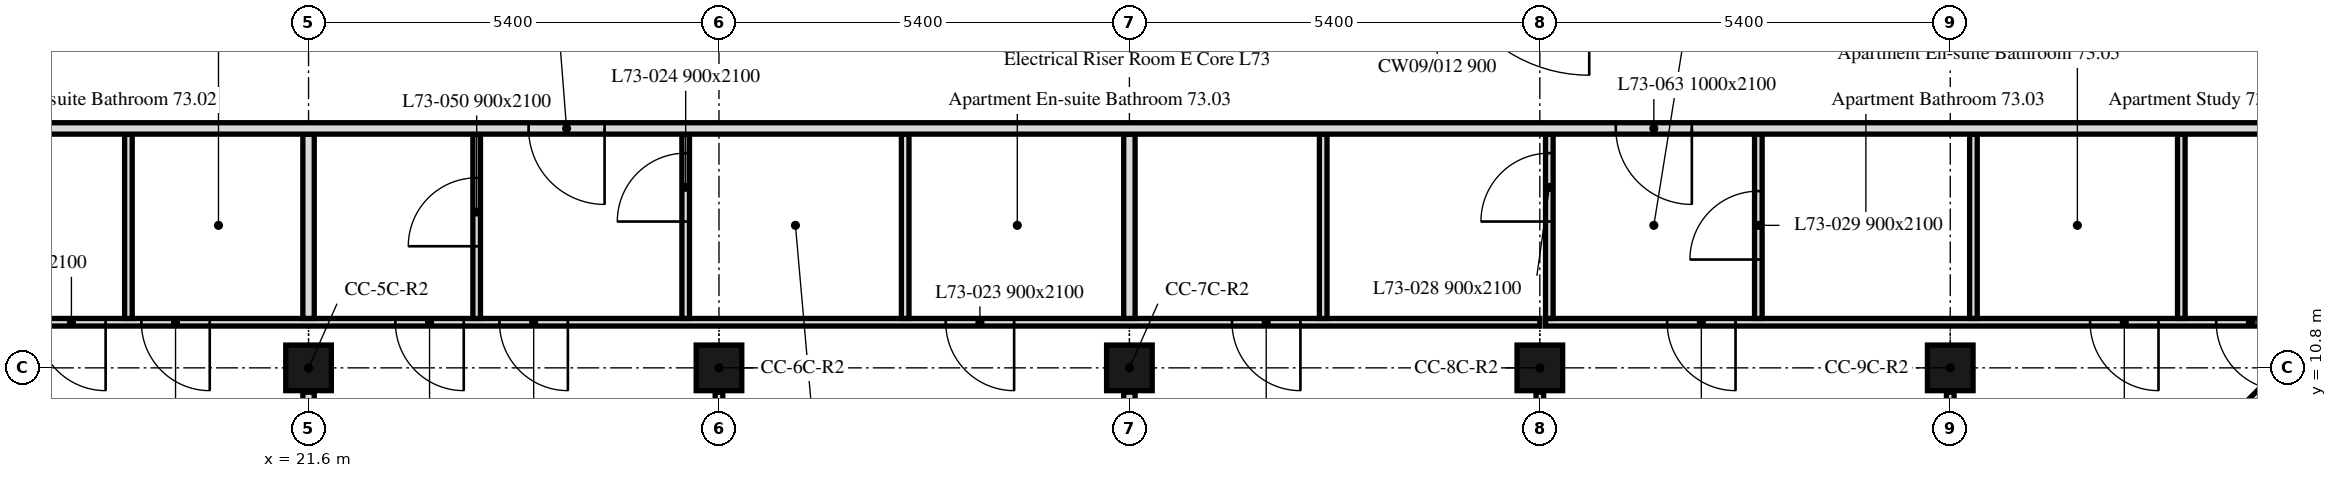
"""IFC4 building model, lengths in metres.
Left out: names, types, materials, properties, quantities, classifications, styles, units other than length and angle.
Written with IfcOpenShell. Run it as: python <this file> out.ifc"""

import sys

from ifc_helpers import new_model, si_unit, direction, frame, frame_2d, origin, origin_2d, place, context, subcontext, project, spatial, rectangle, extrude, element, fill, save


model = new_model("IFC4")
c1 = context("Model", 3, precision=1e-05, world=origin(), true_north=direction((0.0, 1.0)))
c2 = subcontext(c1, "Body", "Model", "MODEL_VIEW")
j1 = project(units=[si_unit("LENGTHUNIT", "METRE"), si_unit("PLANEANGLEUNIT", "RADIAN")], contexts=[c1])
p1 = place(None, origin())
s1 = spatial("IfcSite", under=j1, at=p1, CompositionType="ELEMENT")
p2 = place(p1, origin())
s2 = spatial("IfcBuilding", under=s1, at=p2, CompositionType="ELEMENT")
p3 = place(p2, frame((0.0, 0.0, 295.0)))
s3 = spatial("IfcBuildingStorey", under=s2, at=p3, CompositionType="ELEMENT", Elevation=295.0)
for number, where, z_axis, x_axis in (
    (1, (21.6, 10.8, 0.0), (0.0, 0.0, 1.0), (1.0, 0.0, 0.0)),
    (2, (27.0, 10.8, 0.0), (0.0, 0.0, 1.0), (1.0, 0.0, 0.0)),
    (3, (32.4, 10.8, 0.0), (0.0, 0.0, 1.0), (1.0, 0.0, 0.0)),
    (4, (37.8, 10.8, 0.0), (0.0, 0.0, 1.0), (1.0, 0.0, 0.0)),
    (5, (43.2, 10.8, 0.0), (0.0, 0.0, 1.0), (1.0, 0.0, 0.0)),
):
    element("IfcColumn", number, at=place(p3, frame(where, z_axis=z_axis, x_axis=x_axis)), inside=s3, PredefinedType="COLUMN", context=c2, shape_type="SweptSolid", body=[
        extrude(rectangle(XDim=0.6, YDim=0.6, at=origin_2d()), origin(), (0.0, 0.0, 1.0), 3.0),
    ])
p4 = place(p3, frame((43.051, 6.099, 0.0), z_axis=(0.0, 0.0, 1.0), x_axis=(0.707106781187, 0.707106781187, 0.0)))
e6 = element("IfcWall", 6, at=p4, inside=s3, PredefinedType="SOLIDWALL", context=c2, shape_type="SweptSolid", body=[
    extrude(rectangle(XDim=6.86, YDim=0.3, at=frame_2d((3.43, 0.0))), origin(), (0.0, 0.0, 1.0), 3.0),
])
p5 = place(p4, frame((1.73, 0.0, 0.9)))
e7 = element("IfcOpeningElement", 7, at=p5, cuts=e6, PredefinedType="OPENING", context=c2, shape_type="SweptSolid", body=[
    extrude(rectangle(XDim=3.4, YDim=1.7, at=frame_2d((1.7, 0.85))), frame((0.0, 0.16, 0.0), z_axis=(0.0, -1.0, 0.0), x_axis=(1.0, 0.0, 0.0)), (0.0, 0.0, 1.0), 0.32),
])
p6 = place(p3, frame((21.6, 6.151, 0.0), z_axis=(0.0, 0.0, 1.0), x_axis=(0.0, 1.0, 0.0)))
e8 = element("IfcWall", 8, at=p6, inside=s3, PredefinedType="PARTITIONING", context=c2, shape_type="SweptSolid", body=[
    extrude(rectangle(XDim=4.329, YDim=0.15, at=frame_2d((2.165, 0.0))), origin(), (0.0, 0.0, 1.0), 3.0),
])
p7 = place(p3, frame((37.8, 11.4, 0.0), z_axis=(0.0, 0.0, 1.0), x_axis=(-1.0, 0.0, 0.0)))
e9 = element("IfcWall", 9, at=p7, inside=s3, PredefinedType="PARTITIONING", context=c2, shape_type="SweptSolid", body=[
    extrude(rectangle(XDim=21.6, YDim=0.1, at=frame_2d((10.8, 0.0))), origin(), (0.0, 0.0, 1.0), 3.0),
])
p8 = place(p7, frame((18.87, 0.0, 0.0)))
e10 = element("IfcOpeningElement", 10, at=p8, cuts=e9, PredefinedType="OPENING", context=c2, shape_type="SweptSolid", body=[
    extrude(rectangle(XDim=0.9, YDim=2.1, at=frame_2d((0.45, 1.05))), frame((0.0, 0.05, 0.0), z_axis=(0.0, -1.0, 0.0), x_axis=(1.0, 0.0, 0.0)), (0.0, 0.0, 1.0), 0.1),
])
p9 = place(p7, frame((17.5, 0.0, 0.0)))
e11 = element("IfcOpeningElement", 11, at=p9, cuts=e9, PredefinedType="OPENING", context=c2, shape_type="SweptSolid", body=[
    extrude(rectangle(XDim=0.9, YDim=2.1, at=frame_2d((0.45, 1.05))), frame((0.0, 0.05, 0.0), z_axis=(0.0, -1.0, 0.0), x_axis=(1.0, 0.0, 0.0)), (0.0, 0.0, 1.0), 0.1),
])
p10 = place(p7, frame((6.917, 0.0, 0.0)))
e12 = element("IfcOpeningElement", 12, at=p10, cuts=e9, PredefinedType="OPENING", context=c2, shape_type="SweptSolid", body=[
    extrude(rectangle(XDim=0.9, YDim=2.1, at=frame_2d((0.45, 1.05))), frame((0.0, 0.05, 0.0), z_axis=(0.0, -1.0, 0.0), x_axis=(1.0, 0.0, 0.0)), (0.0, 0.0, 1.0), 0.1),
])
p11 = place(p7, frame((3.15, 0.0, 0.0)))
e13 = element("IfcOpeningElement", 13, at=p11, cuts=e9, PredefinedType="OPENING", context=c2, shape_type="SweptSolid", body=[
    extrude(rectangle(XDim=0.9, YDim=2.1, at=frame_2d((0.45, 1.05))), frame((0.0, 0.05, 0.0), z_axis=(0.0, -1.0, 0.0), x_axis=(1.0, 0.0, 0.0)), (0.0, 0.0, 1.0), 0.1),
])
p12 = place(p7, frame((14.158, 0.0, 0.0)))
e14 = element("IfcOpeningElement", 14, at=p12, cuts=e9, PredefinedType="OPENING", context=c2, shape_type="SweptSolid", body=[
    extrude(rectangle(XDim=0.9, YDim=2.1, at=frame_2d((0.45, 1.05))), frame((0.0, 0.05, 0.0), z_axis=(0.0, -1.0, 0.0), x_axis=(1.0, 0.0, 0.0)), (0.0, 0.0, 1.0), 0.1),
])
p13 = place(p7, frame((12.788, 0.0, 0.0)))
e15 = element("IfcOpeningElement", 15, at=p13, cuts=e9, PredefinedType="OPENING", context=c2, shape_type="SweptSolid", body=[
    extrude(rectangle(XDim=0.9, YDim=2.1, at=frame_2d((0.45, 1.05))), frame((0.0, 0.05, 0.0), z_axis=(0.0, -1.0, 0.0), x_axis=(1.0, 0.0, 0.0)), (0.0, 0.0, 1.0), 0.1),
])
p14 = place(p3, frame((19.23, 11.45, 0.0), z_axis=(0.0, 0.0, 1.0), x_axis=(0.0, 1.0, 0.0)))
e16 = element("IfcWall", 16, at=p14, inside=s3, PredefinedType="PARTITIONING", context=c2, shape_type="SweptSolid", body=[
    extrude(rectangle(XDim=2.425, YDim=0.1, at=frame_2d((1.212, 0.0))), origin(), (0.0, 0.0, 1.0), 3.0),
])
p15 = place(p3, frame((21.6, 11.45, 0.0), z_axis=(0.0, 0.0, 1.0), x_axis=(0.0, 1.0, 0.0)))
e17 = element("IfcWall", 17, at=p15, inside=s3, PredefinedType="PARTITIONING", context=c2, shape_type="SweptSolid", body=[
    extrude(rectangle(XDim=2.425, YDim=0.15, at=frame_2d((1.212, 0.0))), origin(), (0.0, 0.0, 1.0), 3.0),
])
p16 = place(p3, frame((27.0, 6.151, 0.0), z_axis=(0.0, 0.0, 1.0), x_axis=(0.0, 1.0, 0.0)))
e18 = element("IfcWall", 18, at=p16, inside=s3, PredefinedType="PARTITIONING", context=c2, shape_type="SweptSolid", body=[
    extrude(rectangle(XDim=4.329, YDim=0.1, at=frame_2d((2.165, 0.0))), origin(), (0.0, 0.0, 1.0), 3.0),
])
p17 = place(p16, frame((1.424, 0.0, 0.0)))
e19 = element("IfcOpeningElement", 19, at=p17, cuts=e18, PredefinedType="OPENING", context=c2, shape_type="SweptSolid", body=[
    extrude(rectangle(XDim=0.9, YDim=2.1, at=frame_2d((0.45, 1.05))), frame((0.0, 0.05, 0.0), z_axis=(0.0, -1.0, 0.0), x_axis=(1.0, 0.0, 0.0)), (0.0, 0.0, 1.0), 0.1),
])
p18 = place(p3, frame((32.4, 6.151, 0.0), z_axis=(0.0, 0.0, 1.0), x_axis=(0.0, 1.0, 0.0)))
e20 = element("IfcWall", 20, at=p18, inside=s3, PredefinedType="PARTITIONING", context=c2, shape_type="SweptSolid", body=[
    extrude(rectangle(XDim=4.329, YDim=0.15, at=frame_2d((2.165, 0.0))), origin(), (0.0, 0.0, 1.0), 3.0),
])
p19 = place(p3, frame((23.812, 11.45, 0.0), z_axis=(0.0, 0.0, 1.0), x_axis=(0.0, 1.0, 0.0)))
e21 = element("IfcWall", 21, at=p19, inside=s3, PredefinedType="PARTITIONING", context=c2, shape_type="SweptSolid", body=[
    extrude(rectangle(XDim=2.425, YDim=0.1, at=frame_2d((1.212, 0.0))), origin(), (0.0, 0.0, 1.0), 3.0),
])
p20 = place(p19, frame((0.95, 0.0, 0.0)))
e22 = element("IfcOpeningElement", 22, at=p20, cuts=e21, PredefinedType="OPENING", context=c2, shape_type="SweptSolid", body=[
    extrude(rectangle(XDim=0.9, YDim=2.1, at=frame_2d((0.45, 1.05))), frame((0.0, 0.05, 0.0), z_axis=(0.0, -1.0, 0.0), x_axis=(1.0, 0.0, 0.0)), (0.0, 0.0, 1.0), 0.1),
])
p21 = place(p3, frame((26.562, 11.45, 0.0), z_axis=(0.0, 0.0, 1.0), x_axis=(0.0, 1.0, 0.0)))
e23 = element("IfcWall", 23, at=p21, inside=s3, PredefinedType="PARTITIONING", context=c2, shape_type="SweptSolid", body=[
    extrude(rectangle(XDim=2.425, YDim=0.1, at=frame_2d((1.212, 0.0))), origin(), (0.0, 0.0, 1.0), 3.0),
])
p22 = place(p21, frame((1.275, 0.0, 0.0)))
e24 = element("IfcOpeningElement", 24, at=p22, cuts=e23, PredefinedType="OPENING", context=c2, shape_type="SweptSolid", body=[
    extrude(rectangle(XDim=0.9, YDim=2.1, at=frame_2d((0.45, 1.05))), frame((0.0, 0.05, 0.0), z_axis=(0.0, -1.0, 0.0), x_axis=(1.0, 0.0, 0.0)), (0.0, 0.0, 1.0), 0.1),
])
p23 = place(p3, frame((29.45, 11.45, 0.0), z_axis=(0.0, 0.0, 1.0), x_axis=(0.0, 1.0, 0.0)))
e25 = element("IfcWall", 25, at=p23, inside=s3, PredefinedType="PARTITIONING", context=c2, shape_type="SweptSolid", body=[
    extrude(rectangle(XDim=2.425, YDim=0.1, at=frame_2d((1.212, 0.0))), origin(), (0.0, 0.0, 1.0), 3.0),
])
p24 = place(p3, frame((32.4, 11.45, 0.0), z_axis=(0.0, 0.0, 1.0), x_axis=(0.0, 1.0, 0.0)))
e26 = element("IfcWall", 26, at=p24, inside=s3, PredefinedType="PARTITIONING", context=c2, shape_type="SweptSolid", body=[
    extrude(rectangle(XDim=2.425, YDim=0.15, at=frame_2d((1.212, 0.0))), origin(), (0.0, 0.0, 1.0), 3.0),
])
p25 = place(p3, frame((37.8, 6.151, 0.0), z_axis=(0.0, 0.0, 1.0), x_axis=(0.0, 1.0, 0.0)))
e27 = element("IfcWall", 27, at=p25, inside=s3, PredefinedType="PARTITIONING", context=c2, shape_type="SweptSolid", body=[
    extrude(rectangle(XDim=4.329, YDim=0.1, at=frame_2d((2.165, 0.0))), origin(), (0.0, 0.0, 1.0), 3.0),
])
p26 = place(p25, frame((1.424, 0.0, 0.0)))
e28 = element("IfcOpeningElement", 28, at=p26, cuts=e27, PredefinedType="OPENING", context=c2, shape_type="SweptSolid", body=[
    extrude(rectangle(XDim=0.9, YDim=2.1, at=frame_2d((0.45, 1.05))), frame((0.0, 0.05, 0.0), z_axis=(0.0, -1.0, 0.0), x_axis=(1.0, 0.0, 0.0)), (0.0, 0.0, 1.0), 0.1),
])
p27 = place(p3, frame((43.2, 6.512, 0.0), z_axis=(0.0, 0.0, 1.0), x_axis=(0.0, 1.0, 0.0)))
e29 = element("IfcWall", 29, at=p27, inside=s3, PredefinedType="PARTITIONING", context=c2, shape_type="SweptSolid", body=[
    extrude(rectangle(XDim=3.968, YDim=0.1, at=frame_2d((1.984, 0.0))), origin(), (0.0, 0.0, 1.0), 3.0),
])
p28 = place(p27, frame((1.938, 0.0, 0.0)))
e30 = element("IfcOpeningElement", 30, at=p28, cuts=e29, PredefinedType="OPENING", context=c2, shape_type="SweptSolid", body=[
    extrude(rectangle(XDim=0.9, YDim=2.1, at=frame_2d((0.45, 1.05))), frame((0.0, 0.05, 0.0), z_axis=(0.0, -1.0, 0.0), x_axis=(1.0, 0.0, 0.0)), (0.0, 0.0, 1.0), 0.1),
])
p29 = place(p3, frame((47.849, 11.4, 0.0), z_axis=(0.0, 0.0, 1.0), x_axis=(-1.0, 0.0, 0.0)))
e31 = element("IfcWall", 31, at=p29, inside=s3, PredefinedType="PARTITIONING", context=c2, shape_type="SweptSolid", body=[
    extrude(rectangle(XDim=9.974, YDim=0.1, at=frame_2d((4.987, 0.0))), origin(), (0.0, 0.0, 1.0), 3.0),
])
p30 = place(p29, frame((1.909, 0.0, 0.0)))
e32 = element("IfcOpeningElement", 32, at=p30, cuts=e31, PredefinedType="OPENING", context=c2, shape_type="SweptSolid", body=[
    extrude(rectangle(XDim=0.9, YDim=2.1, at=frame_2d((0.45, 1.05))), frame((0.0, 0.05, 0.0), z_axis=(0.0, -1.0, 0.0), x_axis=(1.0, 0.0, 0.0)), (0.0, 0.0, 1.0), 0.1),
])
p31 = place(p29, frame((0.25, 0.0, 0.0)))
e33 = element("IfcOpeningElement", 33, at=p31, cuts=e31, PredefinedType="OPENING", context=c2, shape_type="SweptSolid", body=[
    extrude(rectangle(XDim=0.9, YDim=2.1, at=frame_2d((0.45, 1.05))), frame((0.0, 0.05, 0.0), z_axis=(0.0, -1.0, 0.0), x_axis=(1.0, 0.0, 0.0)), (0.0, 0.0, 1.0), 0.1),
])
p32 = place(p29, frame((7.474, 0.0, 0.0)))
e34 = element("IfcOpeningElement", 34, at=p32, cuts=e31, PredefinedType="OPENING", context=c2, shape_type="SweptSolid", body=[
    extrude(rectangle(XDim=0.9, YDim=2.1, at=frame_2d((0.45, 1.05))), frame((0.0, 0.05, 0.0), z_axis=(0.0, -1.0, 0.0), x_axis=(1.0, 0.0, 0.0)), (0.0, 0.0, 1.0), 0.1),
])
p33 = place(p3, frame((34.95, 11.45, 0.0), z_axis=(0.0, 0.0, 1.0), x_axis=(0.0, 1.0, 0.0)))
e35 = element("IfcWall", 35, at=p33, inside=s3, PredefinedType="PARTITIONING", context=c2, shape_type="SweptSolid", body=[
    extrude(rectangle(XDim=2.425, YDim=0.1, at=frame_2d((1.212, 0.0))), origin(), (0.0, 0.0, 1.0), 3.0),
])
p34 = place(p3, frame((37.925, 11.45, 0.0), z_axis=(0.0, 0.0, 1.0), x_axis=(0.0, 1.0, 0.0)))
e36 = element("IfcWall", 36, at=p34, inside=s3, PredefinedType="PARTITIONING", context=c2, shape_type="SweptSolid", body=[
    extrude(rectangle(XDim=2.425, YDim=0.1, at=frame_2d((1.212, 0.0))), origin(), (0.0, 0.0, 1.0), 3.0),
])
p35 = place(p34, frame((1.275, 0.0, 0.0)))
e37 = element("IfcOpeningElement", 37, at=p35, cuts=e36, PredefinedType="OPENING", context=c2, shape_type="SweptSolid", body=[
    extrude(rectangle(XDim=0.9, YDim=2.1, at=frame_2d((0.45, 1.05))), frame((0.0, 0.05, 0.0), z_axis=(0.0, -1.0, 0.0), x_axis=(1.0, 0.0, 0.0)), (0.0, 0.0, 1.0), 0.1),
])
p36 = place(p3, frame((40.675, 11.45, 0.0), z_axis=(0.0, 0.0, 1.0), x_axis=(0.0, 1.0, 0.0)))
e38 = element("IfcWall", 38, at=p36, inside=s3, PredefinedType="PARTITIONING", context=c2, shape_type="SweptSolid", body=[
    extrude(rectangle(XDim=2.425, YDim=0.1, at=frame_2d((1.212, 0.0))), origin(), (0.0, 0.0, 1.0), 3.0),
])
p37 = place(p36, frame((0.775, 0.0, 0.0)))
e39 = element("IfcOpeningElement", 39, at=p37, cuts=e38, PredefinedType="OPENING", context=c2, shape_type="SweptSolid", body=[
    extrude(rectangle(XDim=0.9, YDim=2.1, at=frame_2d((0.45, 1.05))), frame((0.0, 0.05, 0.0), z_axis=(0.0, -1.0, 0.0), x_axis=(1.0, 0.0, 0.0)), (0.0, 0.0, 1.0), 0.1),
])
for number, where, z_axis, x_axis in (
    (40, (43.505, 11.45, 0.0), (0.0, 0.0, 1.0), (0.0, 1.0, 0.0)),
    (41, (46.24, 11.45, 0.0), (0.0, 0.0, 1.0), (0.0, 1.0, 0.0)),
):
    element("IfcWall", number, at=place(p3, frame(where, z_axis=z_axis, x_axis=x_axis)), inside=s3, PredefinedType="PARTITIONING", context=c2, shape_type="SweptSolid", body=[
        extrude(rectangle(XDim=2.425, YDim=0.1, at=frame_2d((1.212, 0.0))), origin(), (0.0, 0.0, 1.0), 3.0),
    ])
p38 = place(p3, frame((47.849, 13.95, 0.0), z_axis=(0.0, 0.0, 1.0), x_axis=(-1.0, 0.0, 0.0)))
e42 = element("IfcWall", 42, at=p38, inside=s3, PredefinedType="PARTITIONING", context=c2, shape_type="SweptSolid", body=[
    extrude(rectangle(XDim=41.698, YDim=0.15, at=frame_2d((20.849, 0.0))), origin(), (0.0, 0.0, 1.0), 3.0),
])
p39 = place(p38, frame((35.609, 0.0, 0.0)))
e43 = element("IfcOpeningElement", 43, at=p39, cuts=e42, PredefinedType="OPENING", context=c2, shape_type="SweptSolid", body=[
    extrude(rectangle(XDim=1.0, YDim=2.1, at=frame_2d((0.5, 1.05))), frame((0.0, 0.075, 0.0), z_axis=(0.0, -1.0, 0.0), x_axis=(1.0, 0.0, 0.0)), (0.0, 0.0, 1.0), 0.15),
])
p40 = place(p38, frame((22.354, 0.0, 0.0)))
e44 = element("IfcOpeningElement", 44, at=p40, cuts=e42, PredefinedType="OPENING", context=c2, shape_type="SweptSolid", body=[
    extrude(rectangle(XDim=1.0, YDim=2.1, at=frame_2d((0.5, 1.05))), frame((0.0, 0.075, 0.0), z_axis=(0.0, -1.0, 0.0), x_axis=(1.0, 0.0, 0.0)), (0.0, 0.0, 1.0), 0.15),
])
p41 = place(p38, frame((8.049, 0.0, 0.0)))
e45 = element("IfcOpeningElement", 45, at=p41, cuts=e42, PredefinedType="OPENING", context=c2, shape_type="SweptSolid", body=[
    extrude(rectangle(XDim=1.0, YDim=2.1, at=frame_2d((0.5, 1.05))), frame((0.0, 0.075, 0.0), z_axis=(0.0, -1.0, 0.0), x_axis=(1.0, 0.0, 0.0)), (0.0, 0.0, 1.0), 0.15),
])
p42 = place(p8, origin())
e46 = element("IfcDoor", 46, at=p42, inside=s3, OperationType="SINGLE_SWING_LEFT", PredefinedType="DOOR", context=c2, shape_type="SweptSolid", body=[
    extrude(rectangle(XDim=0.9, YDim=2.1, at=frame_2d((0.45, 1.05))), frame((0.0, 0.025, 0.0), z_axis=(0.0, -1.0, 0.0), x_axis=(1.0, 0.0, 0.0)), (0.0, 0.0, 1.0), 0.05),
])
fill(e10, e46)
p43 = place(p9, origin())
e47 = element("IfcDoor", 47, at=p43, inside=s3, OperationType="SINGLE_SWING_RIGHT", PredefinedType="DOOR", context=c2, shape_type="SweptSolid", body=[
    extrude(rectangle(XDim=0.9, YDim=2.1, at=frame_2d((0.45, 1.05))), frame((0.0, 0.025, 0.0), z_axis=(0.0, -1.0, 0.0), x_axis=(1.0, 0.0, 0.0)), (0.0, 0.0, 1.0), 0.05),
])
fill(e11, e47)
p44 = place(p10, origin())
e48 = element("IfcDoor", 48, at=p44, inside=s3, OperationType="SINGLE_SWING_LEFT", PredefinedType="DOOR", context=c2, shape_type="SweptSolid", body=[
    extrude(rectangle(XDim=0.9, YDim=2.1, at=frame_2d((0.45, 1.05))), frame((0.0, 0.025, 0.0), z_axis=(0.0, -1.0, 0.0), x_axis=(1.0, 0.0, 0.0)), (0.0, 0.0, 1.0), 0.05),
])
fill(e12, e48)
p45 = place(p22, origin())
e49 = element("IfcDoor", 49, at=p45, inside=s3, OperationType="SINGLE_SWING_LEFT", PredefinedType="DOOR", context=c2, shape_type="SweptSolid", body=[
    extrude(rectangle(XDim=0.9, YDim=2.1, at=frame_2d((0.45, 1.05))), frame((0.0, 0.025, 0.0), z_axis=(0.0, -1.0, 0.0), x_axis=(1.0, 0.0, 0.0)), (0.0, 0.0, 1.0), 0.05),
])
fill(e24, e49)
p46 = place(p11, origin())
e50 = element("IfcDoor", 50, at=p46, inside=s3, OperationType="SINGLE_SWING_RIGHT", PredefinedType="DOOR", context=c2, shape_type="SweptSolid", body=[
    extrude(rectangle(XDim=0.9, YDim=2.1, at=frame_2d((0.45, 1.05))), frame((0.0, 0.025, 0.0), z_axis=(0.0, -1.0, 0.0), x_axis=(1.0, 0.0, 0.0)), (0.0, 0.0, 1.0), 0.05),
])
fill(e13, e50)
p47 = place(p30, origin())
e51 = element("IfcDoor", 51, at=p47, inside=s3, OperationType="SINGLE_SWING_LEFT", PredefinedType="DOOR", context=c2, shape_type="SweptSolid", body=[
    extrude(rectangle(XDim=0.9, YDim=2.1, at=frame_2d((0.45, 1.05))), frame((0.0, 0.025, 0.0), z_axis=(0.0, -1.0, 0.0), x_axis=(1.0, 0.0, 0.0)), (0.0, 0.0, 1.0), 0.05),
])
fill(e32, e51)
p48 = place(p31, origin())
e52 = element("IfcDoor", 52, at=p48, inside=s3, OperationType="SINGLE_SWING_RIGHT", PredefinedType="DOOR", context=c2, shape_type="SweptSolid", body=[
    extrude(rectangle(XDim=0.9, YDim=2.1, at=frame_2d((0.45, 1.05))), frame((0.0, 0.025, 0.0), z_axis=(0.0, -1.0, 0.0), x_axis=(1.0, 0.0, 0.0)), (0.0, 0.0, 1.0), 0.05),
])
fill(e33, e52)
p49 = place(p35, origin())
e53 = element("IfcDoor", 53, at=p49, inside=s3, OperationType="SINGLE_SWING_RIGHT", PredefinedType="DOOR", context=c2, shape_type="SweptSolid", body=[
    extrude(rectangle(XDim=0.9, YDim=2.1, at=frame_2d((0.45, 1.05))), frame((0.0, 0.025, 0.0), z_axis=(0.0, -1.0, 0.0), x_axis=(1.0, 0.0, 0.0)), (0.0, 0.0, 1.0), 0.05),
])
fill(e37, e53)
p50 = place(p37, origin())
e54 = element("IfcDoor", 54, at=p50, inside=s3, OperationType="SINGLE_SWING_LEFT", PredefinedType="DOOR", context=c2, shape_type="SweptSolid", body=[
    extrude(rectangle(XDim=0.9, YDim=2.1, at=frame_2d((0.45, 1.05))), frame((0.0, 0.025, 0.0), z_axis=(0.0, -1.0, 0.0), x_axis=(1.0, 0.0, 0.0)), (0.0, 0.0, 1.0), 0.05),
])
fill(e39, e54)
p51 = place(p12, origin())
e55 = element("IfcDoor", 55, at=p51, inside=s3, OperationType="SINGLE_SWING_RIGHT", PredefinedType="DOOR", context=c2, shape_type="SweptSolid", body=[
    extrude(rectangle(XDim=0.9, YDim=2.1, at=frame_2d((0.45, 1.05))), frame((0.0, 0.025, 0.0), z_axis=(0.0, -1.0, 0.0), x_axis=(1.0, 0.0, 0.0)), (0.0, 0.0, 1.0), 0.05),
])
fill(e14, e55)
p52 = place(p20, origin())
e56 = element("IfcDoor", 56, at=p52, inside=s3, OperationType="SINGLE_SWING_LEFT", PredefinedType="DOOR", context=c2, shape_type="SweptSolid", body=[
    extrude(rectangle(XDim=0.9, YDim=2.1, at=frame_2d((0.45, 1.05))), frame((0.0, 0.025, 0.0), z_axis=(0.0, -1.0, 0.0), x_axis=(1.0, 0.0, 0.0)), (0.0, 0.0, 1.0), 0.05),
])
fill(e22, e56)
p53 = place(p13, origin())
e57 = element("IfcDoor", 57, at=p53, inside=s3, OperationType="SINGLE_SWING_LEFT", PredefinedType="DOOR", context=c2, shape_type="SweptSolid", body=[
    extrude(rectangle(XDim=0.9, YDim=2.1, at=frame_2d((0.45, 1.05))), frame((0.0, 0.025, 0.0), z_axis=(0.0, -1.0, 0.0), x_axis=(1.0, 0.0, 0.0)), (0.0, 0.0, 1.0), 0.05),
])
fill(e15, e57)
p54 = place(p32, origin())
e58 = element("IfcDoor", 58, at=p54, inside=s3, OperationType="SINGLE_SWING_RIGHT", PredefinedType="DOOR", context=c2, shape_type="SweptSolid", body=[
    extrude(rectangle(XDim=0.9, YDim=2.1, at=frame_2d((0.45, 1.05))), frame((0.0, 0.025, 0.0), z_axis=(0.0, -1.0, 0.0), x_axis=(1.0, 0.0, 0.0)), (0.0, 0.0, 1.0), 0.05),
])
fill(e34, e58)
p55 = place(p40, origin())
e59 = element("IfcDoor", 59, at=p55, inside=s3, OperationType="SINGLE_SWING_LEFT", PredefinedType="DOOR", context=c2, shape_type="SweptSolid", body=[
    extrude(rectangle(XDim=1.0, YDim=2.1, at=frame_2d((0.5, 1.05))), frame((0.0, 0.025, 0.0), z_axis=(0.0, -1.0, 0.0), x_axis=(1.0, 0.0, 0.0)), (0.0, 0.0, 1.0), 0.05),
])
fill(e44, e59)
p56 = place(p41, origin())
e60 = element("IfcDoor", 60, at=p56, inside=s3, OperationType="SINGLE_SWING_LEFT", PredefinedType="DOOR", context=c2, shape_type="SweptSolid", body=[
    extrude(rectangle(XDim=1.0, YDim=2.1, at=frame_2d((0.5, 1.05))), frame((0.0, 0.025, 0.0), z_axis=(0.0, -1.0, 0.0), x_axis=(1.0, 0.0, 0.0)), (0.0, 0.0, 1.0), 0.05),
])
fill(e45, e60)
save(model, sys.argv[1])
